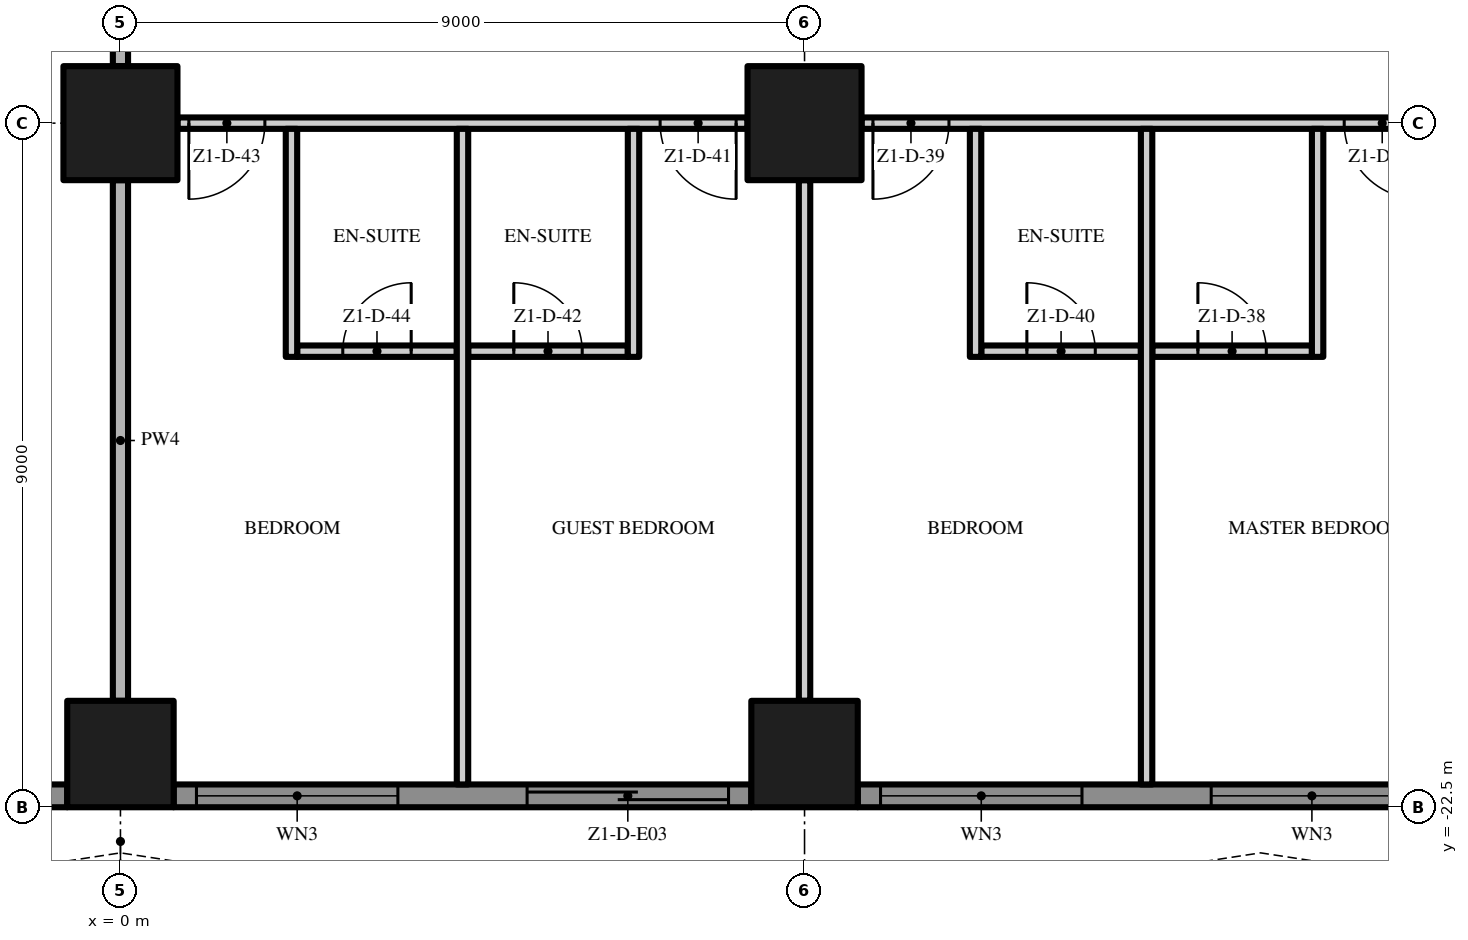
"""IFC4 building model, lengths in metres.
Left out: names, types, materials, properties, quantities, classifications, styles, units other than length and angle.
Written with IfcOpenShell. Run it as: python <this file> out.ifc"""

import sys

from ifc_helpers import new_model, si_unit, direction, frame, frame_2d, origin, origin_2d, place, context, subcontext, project, spatial, polyline, rectangle, outline, extrude, element, fill, save


model = new_model("IFC4")
c1 = context("Model", 3, precision=1e-05, world=origin(), true_north=direction((0.0, 1.0)))
c2 = subcontext(c1, "Body", "Model", "MODEL_VIEW")
j1 = project(units=[si_unit("LENGTHUNIT", "METRE"), si_unit("PLANEANGLEUNIT", "RADIAN")], contexts=[c1])
p1 = place(None, origin())
s1 = spatial("IfcSite", under=j1, at=p1, CompositionType="ELEMENT")
p2 = place(p1, origin())
s2 = spatial("IfcBuilding", under=s1, at=p2, CompositionType="ELEMENT")
p3 = place(p2, frame((0.0, 0.0, 53.0)))
s3 = spatial("IfcBuildingStorey", under=s2, at=p3, CompositionType="ELEMENT", Elevation=53.0)
p4 = place(p3, frame((0.0, -13.5, 0.0), z_axis=(0.0, 0.0, 1.0), x_axis=(1.0, 0.0, 0.0)))
e1 = element("IfcColumn", 1, at=p4, inside=s3, PredefinedType="COLUMN", context=c2, shape_type="SweptSolid", body=[
    extrude(rectangle(XDim=1.5, YDim=1.5, at=origin_2d()), origin(), (0.0, 0.0, 1.0), 3.5),
])
p5 = place(p3, frame((0.0, -21.8, 0.0), z_axis=(0.0, 0.0, 1.0), x_axis=(1.0, 0.0, 0.0)))
e2 = element("IfcColumn", 2, at=p5, inside=s3, PredefinedType="COLUMN", context=c2, shape_type="SweptSolid", body=[
    extrude(rectangle(XDim=1.4, YDim=1.4, at=origin_2d()), origin(), (0.0, 0.0, 1.0), 3.5),
])
p6 = place(p3, frame((9.0, -13.5, 0.0), z_axis=(0.0, 0.0, 1.0), x_axis=(1.0, 0.0, 0.0)))
e3 = element("IfcColumn", 3, at=p6, inside=s3, PredefinedType="COLUMN", context=c2, shape_type="SweptSolid", body=[
    extrude(rectangle(XDim=1.5, YDim=1.5, at=origin_2d()), origin(), (0.0, 0.0, 1.0), 3.5),
])
p7 = place(p3, frame((9.0, -21.8, 0.0), z_axis=(0.0, 0.0, 1.0), x_axis=(1.0, 0.0, 0.0)))
e4 = element("IfcColumn", 4, at=p7, inside=s3, PredefinedType="COLUMN", context=c2, shape_type="SweptSolid", body=[
    extrude(rectangle(XDim=1.4, YDim=1.4, at=origin_2d()), origin(), (0.0, 0.0, 1.0), 3.5),
])
p8 = place(p3, frame((-0.7, -22.35, 0.0), z_axis=(0.0, 0.0, 1.0), x_axis=(-1.0, 0.0, 0.0)))
e5 = element("IfcWall", 5, at=p8, inside=s3, PredefinedType="SOLIDWALL", context=c2, shape_type="SweptSolid", body=[
    extrude(rectangle(XDim=7.6, YDim=0.3, at=frame_2d((3.8, 0.0))), origin(), (0.0, 0.0, 1.0), 3.5),
])
p9 = place(p8, frame((4.65, 0.0, 0.0)))
e6 = element("IfcOpeningElement", 6, at=p9, cuts=e5, PredefinedType="OPENING", context=c2, shape_type="SweptSolid", body=[
    extrude(rectangle(XDim=2.65, YDim=2.4, at=frame_2d((1.325, 1.2))), frame((0.0, 0.16, 0.0), z_axis=(0.0, -1.0, 0.0), x_axis=(1.0, 0.0, 0.0)), (0.0, 0.0, 1.0), 0.32),
])
p10 = place(p8, frame((0.3, 0.0, 0.45)))
e7 = element("IfcOpeningElement", 7, at=p10, cuts=e5, PredefinedType="OPENING", context=c2, shape_type="SweptSolid", body=[
    extrude(rectangle(XDim=2.65, YDim=2.65, at=frame_2d((1.325, 1.325))), frame((0.0, 0.16, 0.0), z_axis=(0.0, -1.0, 0.0), x_axis=(1.0, 0.0, 0.0)), (0.0, 0.0, 1.0), 0.32),
])
p11 = place(p3, frame((8.3, -22.35, 0.0), z_axis=(0.0, 0.0, 1.0), x_axis=(-1.0, 0.0, 0.0)))
e8 = element("IfcWall", 8, at=p11, inside=s3, PredefinedType="SOLIDWALL", context=c2, shape_type="SweptSolid", body=[
    extrude(rectangle(XDim=7.6, YDim=0.3, at=frame_2d((3.8, 0.0))), origin(), (0.0, 0.0, 1.0), 3.5),
])
p12 = place(p11, frame((4.65, 0.0, 0.45)))
e9 = element("IfcOpeningElement", 9, at=p12, cuts=e8, PredefinedType="OPENING", context=c2, shape_type="SweptSolid", body=[
    extrude(rectangle(XDim=2.65, YDim=2.65, at=frame_2d((1.325, 1.325))), frame((0.0, 0.16, 0.0), z_axis=(0.0, -1.0, 0.0), x_axis=(1.0, 0.0, 0.0)), (0.0, 0.0, 1.0), 0.32),
])
p13 = place(p11, frame((0.3, 0.0, 0.0)))
e10 = element("IfcOpeningElement", 10, at=p13, cuts=e8, PredefinedType="OPENING", context=c2, shape_type="SweptSolid", body=[
    extrude(rectangle(XDim=2.65, YDim=2.4, at=frame_2d((1.325, 1.2))), frame((0.0, 0.16, 0.0), z_axis=(0.0, -1.0, 0.0), x_axis=(1.0, 0.0, 0.0)), (0.0, 0.0, 1.0), 0.32),
])
p14 = place(p3, frame((17.3, -22.35, 0.0), z_axis=(0.0, 0.0, 1.0), x_axis=(-1.0, 0.0, 0.0)))
e11 = element("IfcWall", 11, at=p14, inside=s3, PredefinedType="SOLIDWALL", context=c2, shape_type="SweptSolid", body=[
    extrude(rectangle(XDim=7.6, YDim=0.3, at=frame_2d((3.8, 0.0))), origin(), (0.0, 0.0, 1.0), 3.5),
])
p15 = place(p14, frame((4.65, 0.0, 0.45)))
e12 = element("IfcOpeningElement", 12, at=p15, cuts=e11, PredefinedType="OPENING", context=c2, shape_type="SweptSolid", body=[
    extrude(rectangle(XDim=2.65, YDim=2.65, at=frame_2d((1.325, 1.325))), frame((0.0, 0.16, 0.0), z_axis=(0.0, -1.0, 0.0), x_axis=(1.0, 0.0, 0.0)), (0.0, 0.0, 1.0), 0.32),
])
p16 = place(p14, frame((0.3, 0.0, 0.45)))
e13 = element("IfcOpeningElement", 13, at=p16, cuts=e11, PredefinedType="OPENING", context=c2, shape_type="SweptSolid", body=[
    extrude(rectangle(XDim=2.65, YDim=2.65, at=frame_2d((1.325, 1.325))), frame((0.0, 0.16, 0.0), z_axis=(0.0, -1.0, 0.0), x_axis=(1.0, 0.0, 0.0)), (0.0, 0.0, 1.0), 0.32),
])
p17 = place(p3, origin())
e14 = element("IfcWall", 14, at=p17, inside=s3, PredefinedType="USERDEFINED", context=c2, shape_type="SweptSolid", body=[
    extrude(outline(polyline([(-22.5, -25.5), (-21.0, -25.271), (-19.5, -24.671), (-18.0, -23.929), (-16.5, -23.329), (-15.0, -23.1), (-13.5, -23.329), (-12.0, -23.929), (-10.5, -24.671), (-9.0, -25.271), (-7.5, -25.5), (-6.0, -25.271), (-4.5, -24.671), (-3.0, -23.929), (-1.5, -23.329), (0.0, -23.1), (1.5, -23.329), (3.0, -23.929), (4.5, -24.671), (6.0, -25.271), (7.5, -25.5), (9.0, -25.271), (10.5, -24.671), (12.0, -23.929), (13.5, -23.329), (15.0, -23.1), (16.5, -23.329), (18.0, -23.929), (19.5, -24.671), (21.0, -25.271), (22.5, -25.5), (22.538, -25.253), (21.066, -25.028), (19.602, -24.442), (18.102, -23.701), (16.566, -23.086), (15.0, -22.847), (13.434, -23.086), (11.898, -23.701), (10.398, -24.442), (8.934, -25.028), (7.5, -25.247), (6.066, -25.028), (4.602, -24.442), (3.102, -23.701), (1.566, -23.086), (0.0, -22.847), (-1.566, -23.086), (-3.102, -23.701), (-4.602, -24.442), (-6.066, -25.028), (-7.5, -25.247), (-8.934, -25.028), (-10.398, -24.442), (-11.898, -23.701), (-13.434, -23.086), (-15.0, -22.847), (-16.566, -23.086), (-18.102, -23.701), (-19.602, -24.442), (-21.066, -25.028), (-22.538, -25.253), (-22.5, -25.5)])), origin(), (0.0, 0.0, 1.0), 0.9),
])
p18 = place(p3, frame((2.325, -16.5, 0.0), z_axis=(0.0, 0.0, 1.0), x_axis=(1.0, 0.0, 0.0)))
e15 = element("IfcWall", 15, at=p18, inside=s3, PredefinedType="PARTITIONING", context=c2, shape_type="SweptSolid", body=[
    extrude(rectangle(XDim=2.1, YDim=0.15, at=frame_2d((1.05, 0.0))), origin(), (0.0, 0.0, 1.0), 3.5),
])
p19 = place(p18, frame((0.6, 0.0, 0.0)))
e16 = element("IfcOpeningElement", 16, at=p19, cuts=e15, PredefinedType="OPENING", context=c2, shape_type="SweptSolid", body=[
    extrude(rectangle(XDim=0.9, YDim=2.1, at=frame_2d((0.45, 1.05))), frame((0.0, 0.085, 0.0), z_axis=(0.0, -1.0, 0.0), x_axis=(1.0, 0.0, 0.0)), (0.0, 0.0, 1.0), 0.17),
])
p20 = place(p3, frame((4.575, -16.5, 0.0), z_axis=(0.0, 0.0, 1.0), x_axis=(1.0, 0.0, 0.0)))
e17 = element("IfcWall", 17, at=p20, inside=s3, PredefinedType="PARTITIONING", context=c2, shape_type="SweptSolid", body=[
    extrude(rectangle(XDim=2.1, YDim=0.15, at=frame_2d((1.05, 0.0))), origin(), (0.0, 0.0, 1.0), 3.5),
])
p21 = place(p20, frame((0.6, 0.0, 0.0)))
e18 = element("IfcOpeningElement", 18, at=p21, cuts=e17, PredefinedType="OPENING", context=c2, shape_type="SweptSolid", body=[
    extrude(rectangle(XDim=0.9, YDim=2.1, at=frame_2d((0.45, 1.05))), frame((0.0, 0.085, 0.0), z_axis=(0.0, -1.0, 0.0), x_axis=(1.0, 0.0, 0.0)), (0.0, 0.0, 1.0), 0.17),
])
p22 = place(p3, frame((11.325, -16.5, 0.0), z_axis=(0.0, 0.0, 1.0), x_axis=(1.0, 0.0, 0.0)))
e19 = element("IfcWall", 19, at=p22, inside=s3, PredefinedType="PARTITIONING", context=c2, shape_type="SweptSolid", body=[
    extrude(rectangle(XDim=2.1, YDim=0.15, at=frame_2d((1.05, 0.0))), origin(), (0.0, 0.0, 1.0), 3.5),
])
p23 = place(p22, frame((0.6, 0.0, 0.0)))
e20 = element("IfcOpeningElement", 20, at=p23, cuts=e19, PredefinedType="OPENING", context=c2, shape_type="SweptSolid", body=[
    extrude(rectangle(XDim=0.9, YDim=2.1, at=frame_2d((0.45, 1.05))), frame((0.0, 0.085, 0.0), z_axis=(0.0, -1.0, 0.0), x_axis=(1.0, 0.0, 0.0)), (0.0, 0.0, 1.0), 0.17),
])
p24 = place(p3, frame((13.575, -16.5, 0.0), z_axis=(0.0, 0.0, 1.0), x_axis=(1.0, 0.0, 0.0)))
e21 = element("IfcWall", 21, at=p24, inside=s3, PredefinedType="PARTITIONING", context=c2, shape_type="SweptSolid", body=[
    extrude(rectangle(XDim=2.1, YDim=0.15, at=frame_2d((1.05, 0.0))), origin(), (0.0, 0.0, 1.0), 3.5),
])
p25 = place(p24, frame((0.6, 0.0, 0.0)))
e22 = element("IfcOpeningElement", 22, at=p25, cuts=e21, PredefinedType="OPENING", context=c2, shape_type="SweptSolid", body=[
    extrude(rectangle(XDim=0.9, YDim=2.1, at=frame_2d((0.45, 1.05))), frame((0.0, 0.085, 0.0), z_axis=(0.0, -1.0, 0.0), x_axis=(1.0, 0.0, 0.0)), (0.0, 0.0, 1.0), 0.17),
])
p26 = place(p3, frame((8.25, -13.5, 0.0), z_axis=(0.0, 0.0, 1.0), x_axis=(-1.0, 0.0, 0.0)))
e23 = element("IfcWall", 23, at=p26, inside=s3, PredefinedType="PARTITIONING", context=c2, shape_type="SweptSolid", body=[
    extrude(rectangle(XDim=7.5, YDim=0.15, at=frame_2d((3.75, 0.0))), origin(), (0.0, 0.0, 1.0), 3.5),
])
p27 = place(p26, frame((0.15, 0.0, 0.0)))
e24 = element("IfcOpeningElement", 24, at=p27, cuts=e23, PredefinedType="OPENING", context=c2, shape_type="SweptSolid", body=[
    extrude(rectangle(XDim=1.0, YDim=2.4, at=frame_2d((0.5, 1.2))), frame((0.0, 0.085, 0.0), z_axis=(0.0, -1.0, 0.0), x_axis=(1.0, 0.0, 0.0)), (0.0, 0.0, 1.0), 0.17),
])
p28 = place(p26, frame((6.35, 0.0, 0.0)))
e25 = element("IfcOpeningElement", 25, at=p28, cuts=e23, PredefinedType="OPENING", context=c2, shape_type="SweptSolid", body=[
    extrude(rectangle(XDim=1.0, YDim=2.4, at=frame_2d((0.5, 1.2))), frame((0.0, 0.085, 0.0), z_axis=(0.0, -1.0, 0.0), x_axis=(1.0, 0.0, 0.0)), (0.0, 0.0, 1.0), 0.17),
])
p29 = place(p3, frame((17.25, -13.5, 0.0), z_axis=(0.0, 0.0, 1.0), x_axis=(-1.0, 0.0, 0.0)))
e26 = element("IfcWall", 26, at=p29, inside=s3, PredefinedType="PARTITIONING", context=c2, shape_type="SweptSolid", body=[
    extrude(rectangle(XDim=7.5, YDim=0.15, at=frame_2d((3.75, 0.0))), origin(), (0.0, 0.0, 1.0), 3.5),
])
p30 = place(p29, frame((0.15, 0.0, 0.0)))
e27 = element("IfcOpeningElement", 27, at=p30, cuts=e26, PredefinedType="OPENING", context=c2, shape_type="SweptSolid", body=[
    extrude(rectangle(XDim=1.0, YDim=2.4, at=frame_2d((0.5, 1.2))), frame((0.0, 0.085, 0.0), z_axis=(0.0, -1.0, 0.0), x_axis=(1.0, 0.0, 0.0)), (0.0, 0.0, 1.0), 0.17),
])
p31 = place(p29, frame((6.35, 0.0, 0.0)))
e28 = element("IfcOpeningElement", 28, at=p31, cuts=e26, PredefinedType="OPENING", context=c2, shape_type="SweptSolid", body=[
    extrude(rectangle(XDim=1.0, YDim=2.4, at=frame_2d((0.5, 1.2))), frame((0.0, 0.085, 0.0), z_axis=(0.0, -1.0, 0.0), x_axis=(1.0, 0.0, 0.0)), (0.0, 0.0, 1.0), 0.17),
])
p32 = place(p3, frame((0.0, -21.1, 0.0), z_axis=(0.0, 0.0, 1.0), x_axis=(0.0, 1.0, 0.0)))
e29 = element("IfcWall", 29, at=p32, inside=s3, PredefinedType="PARTITIONING", context=c2, shape_type="SweptSolid", body=[
    extrude(rectangle(XDim=6.85, YDim=0.2, at=frame_2d((3.425, 0.0))), origin(), (0.0, 0.0, 1.0), 3.5),
])
p33 = place(p3, frame((0.0, -12.75, 0.0), z_axis=(0.0, 0.0, 1.0), x_axis=(0.0, 1.0, 0.0)))
e30 = element("IfcWall", 30, at=p33, inside=s3, PredefinedType="PARTITIONING", context=c2, shape_type="SweptSolid", body=[
    extrude(rectangle(XDim=7.5, YDim=0.2, at=frame_2d((3.75, 0.0))), origin(), (0.0, 0.0, 1.0), 3.5),
])
p34 = place(p3, frame((2.25, -16.575, 0.0), z_axis=(0.0, 0.0, 1.0), x_axis=(0.0, 1.0, 0.0)))
e31 = element("IfcWall", 31, at=p34, inside=s3, PredefinedType="PARTITIONING", context=c2, shape_type="SweptSolid", body=[
    extrude(rectangle(XDim=3.0, YDim=0.15, at=frame_2d((1.5, 0.0))), origin(), (0.0, 0.0, 1.0), 3.5),
])
p35 = place(p3, frame((4.5, -22.2, 0.0), z_axis=(0.0, 0.0, 1.0), x_axis=(0.0, 1.0, 0.0)))
e32 = element("IfcWall", 32, at=p35, inside=s3, PredefinedType="PARTITIONING", context=c2, shape_type="SweptSolid", body=[
    extrude(rectangle(XDim=8.625, YDim=0.15, at=frame_2d((4.312, 0.0))), origin(), (0.0, 0.0, 1.0), 3.5),
])
p36 = place(p3, frame((6.75, -16.575, 0.0), z_axis=(0.0, 0.0, 1.0), x_axis=(0.0, 1.0, 0.0)))
e33 = element("IfcWall", 33, at=p36, inside=s3, PredefinedType="PARTITIONING", context=c2, shape_type="SweptSolid", body=[
    extrude(rectangle(XDim=3.0, YDim=0.15, at=frame_2d((1.5, 0.0))), origin(), (0.0, 0.0, 1.0), 3.5),
])
p37 = place(p3, frame((9.0, -21.1, 0.0), z_axis=(0.0, 0.0, 1.0), x_axis=(0.0, 1.0, 0.0)))
e34 = element("IfcWall", 34, at=p37, inside=s3, PredefinedType="PARTITIONING", context=c2, shape_type="SweptSolid", body=[
    extrude(rectangle(XDim=6.85, YDim=0.15, at=frame_2d((3.425, 0.0))), origin(), (0.0, 0.0, 1.0), 3.5),
])
p38 = place(p3, frame((11.25, -16.575, 0.0), z_axis=(0.0, 0.0, 1.0), x_axis=(0.0, 1.0, 0.0)))
e35 = element("IfcWall", 35, at=p38, inside=s3, PredefinedType="PARTITIONING", context=c2, shape_type="SweptSolid", body=[
    extrude(rectangle(XDim=3.0, YDim=0.15, at=frame_2d((1.5, 0.0))), origin(), (0.0, 0.0, 1.0), 3.5),
])
p39 = place(p3, frame((13.5, -22.2, 0.0), z_axis=(0.0, 0.0, 1.0), x_axis=(0.0, 1.0, 0.0)))
e36 = element("IfcWall", 36, at=p39, inside=s3, PredefinedType="PARTITIONING", context=c2, shape_type="SweptSolid", body=[
    extrude(rectangle(XDim=8.625, YDim=0.15, at=frame_2d((4.312, 0.0))), origin(), (0.0, 0.0, 1.0), 3.5),
])
p40 = place(p3, frame((15.75, -16.575, 0.0), z_axis=(0.0, 0.0, 1.0), x_axis=(0.0, 1.0, 0.0)))
e37 = element("IfcWall", 37, at=p40, inside=s3, PredefinedType="PARTITIONING", context=c2, shape_type="SweptSolid", body=[
    extrude(rectangle(XDim=3.0, YDim=0.15, at=frame_2d((1.5, 0.0))), origin(), (0.0, 0.0, 1.0), 3.5),
])
p41 = place(p12, origin())
e38 = element("IfcWindow", 38, at=p41, inside=s3, PartitioningType="SINGLE_PANEL", PredefinedType="WINDOW", context=c2, shape_type="SweptSolid", body=[
    extrude(rectangle(XDim=2.65, YDim=2.65, at=frame_2d((1.325, 1.325))), frame((0.0, 0.03, 0.0), z_axis=(0.0, -1.0, 0.0), x_axis=(1.0, 0.0, 0.0)), (0.0, 0.0, 1.0), 0.06),
])
fill(e9, e38)
p42 = place(p13, origin())
e39 = element("IfcDoor", 39, at=p42, inside=s3, OperationType="SINGLE_SWING_LEFT", PredefinedType="DOOR", context=c2, shape_type="SweptSolid", body=[
    extrude(rectangle(XDim=2.65, YDim=2.4, at=frame_2d((1.325, 1.2))), frame((0.0, 0.025, 0.0), z_axis=(0.0, -1.0, 0.0), x_axis=(1.0, 0.0, 0.0)), (0.0, 0.0, 1.0), 0.05),
])
fill(e10, e39)
p43 = place(p15, origin())
e40 = element("IfcWindow", 40, at=p43, inside=s3, PartitioningType="SINGLE_PANEL", PredefinedType="WINDOW", context=c2, shape_type="SweptSolid", body=[
    extrude(rectangle(XDim=2.65, YDim=2.65, at=frame_2d((1.325, 1.325))), frame((0.0, 0.03, 0.0), z_axis=(0.0, -1.0, 0.0), x_axis=(1.0, 0.0, 0.0)), (0.0, 0.0, 1.0), 0.06),
])
fill(e12, e40)
p44 = place(p16, origin())
e41 = element("IfcWindow", 41, at=p44, inside=s3, PartitioningType="SINGLE_PANEL", PredefinedType="WINDOW", context=c2, shape_type="SweptSolid", body=[
    extrude(rectangle(XDim=2.65, YDim=2.65, at=frame_2d((1.325, 1.325))), frame((0.0, 0.03, 0.0), z_axis=(0.0, -1.0, 0.0), x_axis=(1.0, 0.0, 0.0)), (0.0, 0.0, 1.0), 0.06),
])
fill(e13, e41)
p45 = place(p30, origin())
e42 = element("IfcDoor", 42, at=p45, inside=s3, OperationType="SINGLE_SWING_LEFT", PredefinedType="DOOR", context=c2, shape_type="SweptSolid", body=[
    extrude(rectangle(XDim=1.0, YDim=2.4, at=frame_2d((0.5, 1.2))), frame((0.0, 0.025, 0.0), z_axis=(0.0, -1.0, 0.0), x_axis=(1.0, 0.0, 0.0)), (0.0, 0.0, 1.0), 0.05),
])
fill(e27, e42)
p46 = place(p25, origin())
e43 = element("IfcDoor", 43, at=p46, inside=s3, OperationType="SINGLE_SWING_LEFT", PredefinedType="DOOR", context=c2, shape_type="SweptSolid", body=[
    extrude(rectangle(XDim=0.9, YDim=2.1, at=frame_2d((0.45, 1.05))), frame((0.0, 0.025, 0.0), z_axis=(0.0, -1.0, 0.0), x_axis=(1.0, 0.0, 0.0)), (0.0, 0.0, 1.0), 0.05),
])
fill(e22, e43)
p47 = place(p31, origin())
e44 = element("IfcDoor", 44, at=p47, inside=s3, OperationType="SINGLE_SWING_RIGHT", PredefinedType="DOOR", context=c2, shape_type="SweptSolid", body=[
    extrude(rectangle(XDim=1.0, YDim=2.4, at=frame_2d((0.5, 1.2))), frame((0.0, 0.025, 0.0), z_axis=(0.0, -1.0, 0.0), x_axis=(1.0, 0.0, 0.0)), (0.0, 0.0, 1.0), 0.05),
])
fill(e28, e44)
p48 = place(p23, origin())
e45 = element("IfcDoor", 45, at=p48, inside=s3, OperationType="SINGLE_SWING_LEFT", PredefinedType="DOOR", context=c2, shape_type="SweptSolid", body=[
    extrude(rectangle(XDim=0.9, YDim=2.1, at=frame_2d((0.45, 1.05))), frame((0.0, 0.025, 0.0), z_axis=(0.0, -1.0, 0.0), x_axis=(1.0, 0.0, 0.0)), (0.0, 0.0, 1.0), 0.05),
])
fill(e20, e45)
p49 = place(p27, origin())
e46 = element("IfcDoor", 46, at=p49, inside=s3, OperationType="SINGLE_SWING_LEFT", PredefinedType="DOOR", context=c2, shape_type="SweptSolid", body=[
    extrude(rectangle(XDim=1.0, YDim=2.4, at=frame_2d((0.5, 1.2))), frame((0.0, 0.025, 0.0), z_axis=(0.0, -1.0, 0.0), x_axis=(1.0, 0.0, 0.0)), (0.0, 0.0, 1.0), 0.05),
])
fill(e24, e46)
p50 = place(p21, origin())
e47 = element("IfcDoor", 47, at=p50, inside=s3, OperationType="SINGLE_SWING_LEFT", PredefinedType="DOOR", context=c2, shape_type="SweptSolid", body=[
    extrude(rectangle(XDim=0.9, YDim=2.1, at=frame_2d((0.45, 1.05))), frame((0.0, 0.025, 0.0), z_axis=(0.0, -1.0, 0.0), x_axis=(1.0, 0.0, 0.0)), (0.0, 0.0, 1.0), 0.05),
])
fill(e18, e47)
p51 = place(p28, origin())
e48 = element("IfcDoor", 48, at=p51, inside=s3, OperationType="SINGLE_SWING_RIGHT", PredefinedType="DOOR", context=c2, shape_type="SweptSolid", body=[
    extrude(rectangle(XDim=1.0, YDim=2.4, at=frame_2d((0.5, 1.2))), frame((0.0, 0.025, 0.0), z_axis=(0.0, -1.0, 0.0), x_axis=(1.0, 0.0, 0.0)), (0.0, 0.0, 1.0), 0.05),
])
fill(e25, e48)
p52 = place(p19, origin())
e49 = element("IfcDoor", 49, at=p52, inside=s3, OperationType="SINGLE_SWING_RIGHT", PredefinedType="DOOR", context=c2, shape_type="SweptSolid", body=[
    extrude(rectangle(XDim=0.9, YDim=2.1, at=frame_2d((0.45, 1.05))), frame((0.0, 0.025, 0.0), z_axis=(0.0, -1.0, 0.0), x_axis=(1.0, 0.0, 0.0)), (0.0, 0.0, 1.0), 0.05),
])
fill(e16, e49)
save(model, sys.argv[1])
